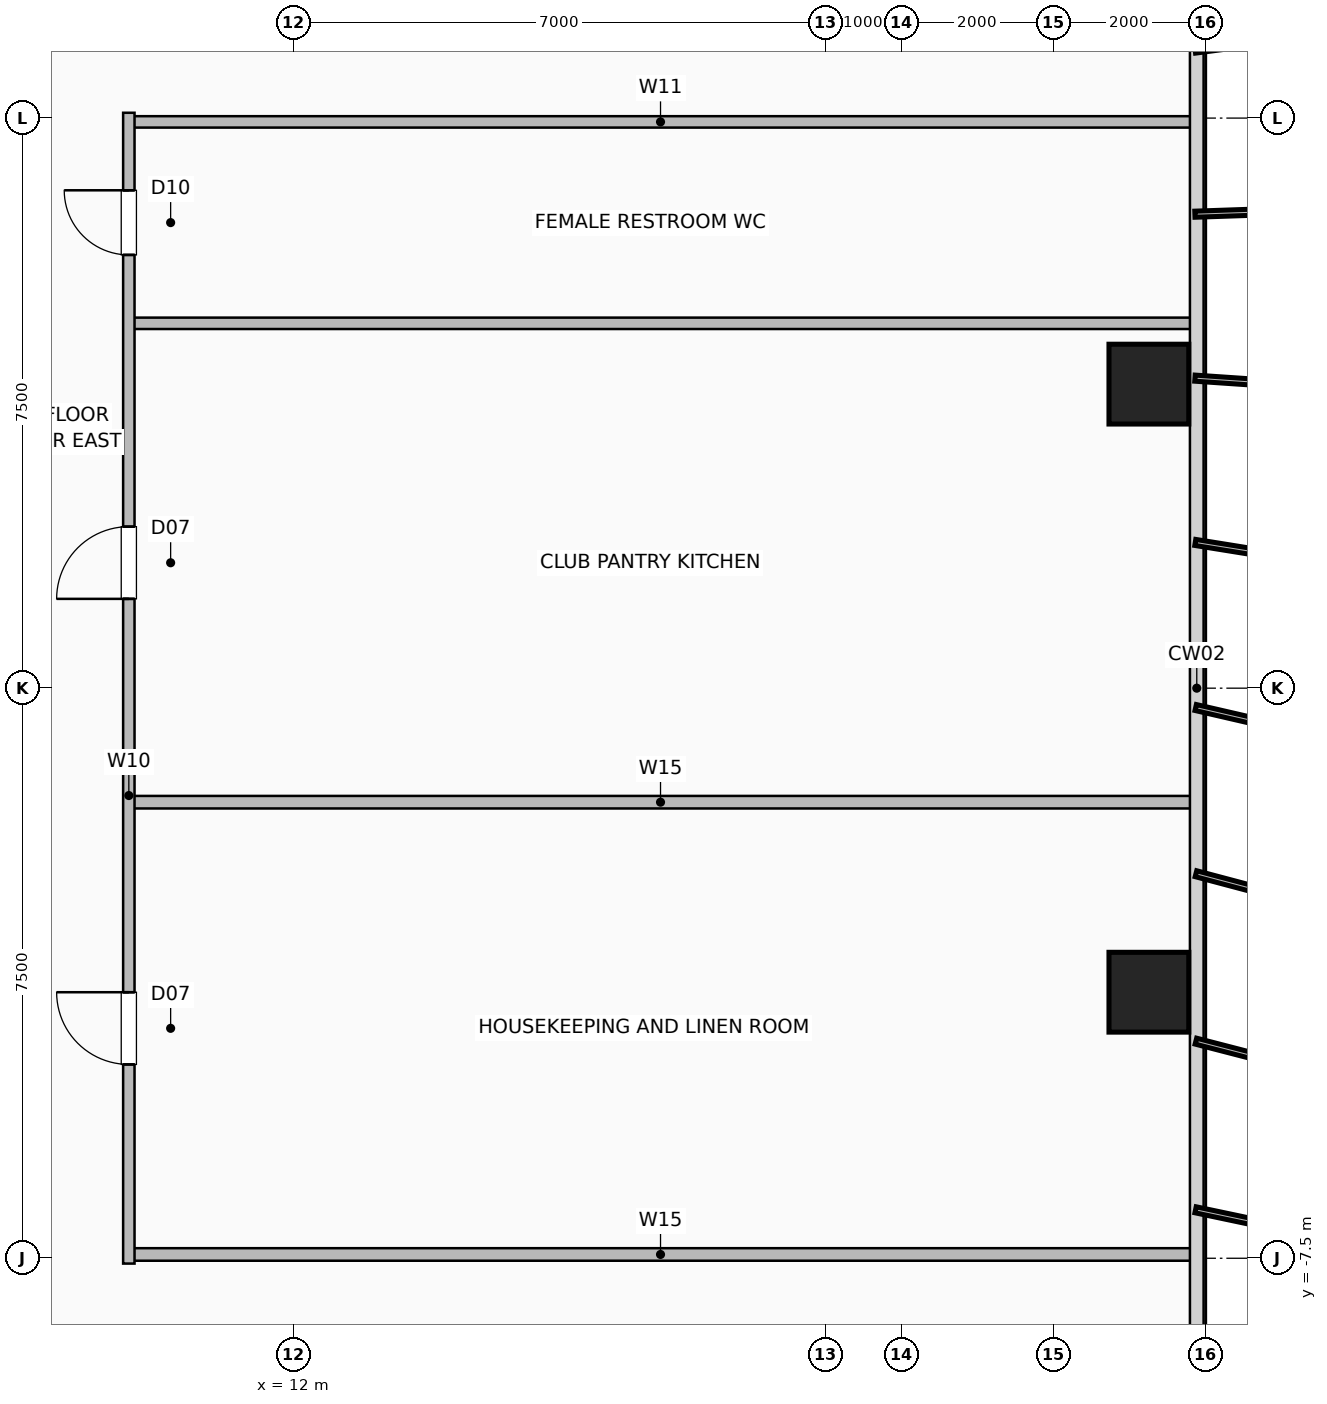
"""IFC4 building model, lengths in metres.
Left out: names, types, materials, properties, quantities, classifications, styles, units other than length and angle.
Written with IfcOpenShell. Run it as: python <this file> out.ifc"""

import sys

from ifc_helpers import new_model, si_unit, direction, frame, frame_2d, origin, origin_2d, place, context, subcontext, project, spatial, rectangle, hollow_rectangle, extrude, element, fill, save


model = new_model("IFC4")
c1 = context("Model", 3, precision=1e-05, world=origin(), true_north=direction((0.0, 1.0)))
c2 = subcontext(c1, "Body", "Model", "MODEL_VIEW")
j1 = project(units=[si_unit("LENGTHUNIT", "METRE"), si_unit("PLANEANGLEUNIT", "RADIAN")], contexts=[c1])
p1 = place(None, origin())
s1 = spatial("IfcSite", under=j1, at=p1, CompositionType="ELEMENT")
p2 = place(p1, origin())
s2 = spatial("IfcBuilding", under=s1, at=p2, CompositionType="ELEMENT")
p3 = place(p2, frame((0.0, 0.0, 58.5)))
s3 = spatial("IfcBuildingStorey", under=s2, at=p3, CompositionType="ELEMENT", Elevation=58.5)
for number, where, z_axis, x_axis in (
    (1, (23.25, -4.0, 0.0), (0.0, 0.0, 1.0), (1.0, 0.0, 0.0)),
    (2, (23.25, 4.0, 0.0), (0.0, 0.0, 1.0), (1.0, 0.0, 0.0)),
):
    element("IfcColumn", number, at=place(p3, frame(where, z_axis=z_axis, x_axis=x_axis)), inside=s3, PredefinedType="COLUMN", context=c2, shape_type="SweptSolid", body=[
        extrude(hollow_rectangle(XDim=1.05, YDim=1.05, WallThickness=0.05, at=origin_2d()), origin(), (0.0, 0.0, 1.0), 3.5),
    ])
for number, where, z_axis, x_axis in (
    (3, (9.83, -7.45, 0.0), (0.0, 0.0, 1.0), (1.0, 0.0, 0.0)),
    (4, (9.83, -1.5, 0.0), (0.0, 0.0, 1.0), (1.0, 0.0, 0.0)),
):
    element("IfcWall", number, at=place(p3, frame(where, z_axis=z_axis, x_axis=x_axis)), inside=s3, PredefinedType="PLUMBINGWALL", context=c2, shape_type="SweptSolid", body=[
        extrude(rectangle(XDim=13.99, YDim=0.165, at=frame_2d((6.995, 0.0))), origin(), (0.0, 0.0, 1.0), 3.25),
    ])
for number, where, z_axis, x_axis in (
    (5, (9.83, 4.8, 0.0), (0.0, 0.0, 1.0), (1.0, 0.0, 0.0)),
    (6, (9.83, 7.45, 0.0), (0.0, 0.0, 1.0), (1.0, 0.0, 0.0)),
):
    element("IfcWall", number, at=place(p3, frame(where, z_axis=z_axis, x_axis=x_axis)), inside=s3, PredefinedType="PARTITIONING", context=c2, shape_type="SweptSolid", body=[
        extrude(rectangle(XDim=13.99, YDim=0.15, at=frame_2d((6.995, 0.0))), origin(), (0.0, 0.0, 1.0), 3.25),
    ])
p4 = place(p3, frame((9.83, -7.57, 0.0), z_axis=(0.0, 0.0, 1.0), x_axis=(0.0, 1.0, 0.0)))
e7 = element("IfcWall", 7, at=p4, inside=s3, PredefinedType="PARTITIONING", context=c2, shape_type="SweptSolid", body=[
    extrude(rectangle(XDim=15.14, YDim=0.15, at=frame_2d((7.57, 0.0))), origin(), (0.0, 0.0, 1.0), 3.25),
])
p5 = place(p4, frame((2.62, 0.0, 0.0)))
e8 = element("IfcOpeningElement", 8, at=p5, cuts=e7, PredefinedType="OPENING", context=c2, shape_type="SweptSolid", body=[
    extrude(rectangle(XDim=0.95, YDim=2.06, at=frame_2d((0.475, 1.03))), frame((0.0, 0.085, 0.0), z_axis=(0.0, -1.0, 0.0), x_axis=(1.0, 0.0, 0.0)), (0.0, 0.0, 1.0), 0.17),
])
p6 = place(p4, frame((8.745, 0.0, 0.0)))
e9 = element("IfcOpeningElement", 9, at=p6, cuts=e7, PredefinedType="OPENING", context=c2, shape_type="SweptSolid", body=[
    extrude(rectangle(XDim=0.95, YDim=2.06, at=frame_2d((0.475, 1.03))), frame((0.0, 0.085, 0.0), z_axis=(0.0, -1.0, 0.0), x_axis=(1.0, 0.0, 0.0)), (0.0, 0.0, 1.0), 0.17),
])
p7 = place(p4, frame((13.27, 0.0, 0.0)))
e10 = element("IfcOpeningElement", 10, at=p7, cuts=e7, PredefinedType="OPENING", context=c2, shape_type="SweptSolid", body=[
    extrude(rectangle(XDim=0.85, YDim=2.05, at=frame_2d((0.425, 1.025))), frame((0.0, 0.085, 0.0), z_axis=(0.0, -1.0, 0.0), x_axis=(1.0, 0.0, 0.0)), (0.0, 0.0, 1.0), 0.17),
])
p8 = place(p5, origin())
e11 = element("IfcDoor", 11, at=p8, inside=s3, OperationType="SINGLE_SWING_RIGHT", PredefinedType="DOOR", context=c2, shape_type="SweptSolid", body=[
    extrude(rectangle(XDim=0.95, YDim=2.06, at=frame_2d((0.475, 1.03))), frame((0.0, 0.025, 0.0), z_axis=(0.0, -1.0, 0.0), x_axis=(1.0, 0.0, 0.0)), (0.0, 0.0, 1.0), 0.05),
])
fill(e8, e11)
p9 = place(p6, origin())
e12 = element("IfcDoor", 12, at=p9, inside=s3, OperationType="SINGLE_SWING_LEFT", PredefinedType="DOOR", context=c2, shape_type="SweptSolid", body=[
    extrude(rectangle(XDim=0.95, YDim=2.06, at=frame_2d((0.475, 1.03))), frame((0.0, 0.025, 0.0), z_axis=(0.0, -1.0, 0.0), x_axis=(1.0, 0.0, 0.0)), (0.0, 0.0, 1.0), 0.05),
])
fill(e9, e12)
p10 = place(p7, origin())
e13 = element("IfcDoor", 13, at=p10, inside=s3, OperationType="SINGLE_SWING_RIGHT", PredefinedType="DOOR", context=c2, shape_type="SweptSolid", body=[
    extrude(rectangle(XDim=0.85, YDim=2.05, at=frame_2d((0.425, 1.025))), frame((0.0, 0.025, 0.0), z_axis=(0.0, -1.0, 0.0), x_axis=(1.0, 0.0, 0.0)), (0.0, 0.0, 1.0), 0.05),
])
fill(e10, e13)
save(model, sys.argv[1])
